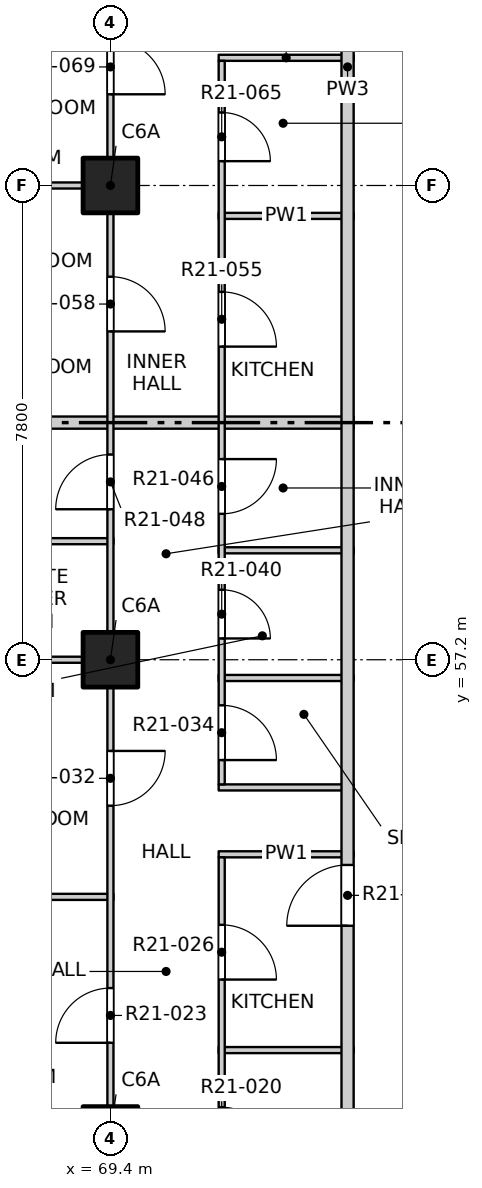
"""IFC4 building model, lengths in metres.
Left out: names, types, materials, properties, quantities, classifications, styles, units other than length and angle.
Written with IfcOpenShell. Run it as: python <this file> out.ifc"""

import sys

from ifc_helpers import new_model, si_unit, direction, frame, frame_2d, origin, origin_2d, place, context, subcontext, project, spatial, rectangle, extrude, element, fill, save


model = new_model("IFC4")
c1 = context("Model", 3, precision=1e-05, world=origin(), true_north=direction((0.0, 1.0)))
c2 = subcontext(c1, "Body", "Model", "MODEL_VIEW")
j1 = project(units=[si_unit("LENGTHUNIT", "METRE"), si_unit("PLANEANGLEUNIT", "RADIAN")], contexts=[c1])
p1 = place(None, origin())
s1 = spatial("IfcSite", under=j1, at=p1, CompositionType="ELEMENT")
p2 = place(p1, origin())
s2 = spatial("IfcBuilding", under=s1, at=p2, CompositionType="ELEMENT")
p3 = place(p2, frame((0.0, 0.0, 214.3)))
s3 = spatial("IfcBuildingStorey", under=s2, at=p3, CompositionType="ELEMENT", Elevation=214.3)
for number, where, z_axis, x_axis in (
    (1, (69.4, 49.4, -0.25), (0.0, 0.0, 1.0), (1.0, 0.0, 0.0)),
    (2, (69.4, 57.2, -0.25), (0.0, 0.0, 1.0), (1.0, 0.0, 0.0)),
    (3, (69.4, 65.0, -0.25), (0.0, 0.0, 1.0), (1.0, 0.0, 0.0)),
):
    element("IfcColumn", number, at=place(p3, frame(where, z_axis=z_axis, x_axis=x_axis)), inside=s3, PredefinedType="COLUMN", context=c2, shape_type="SweptSolid", body=[
        extrude(rectangle(XDim=0.9, YDim=0.9, at=origin_2d()), origin(), (0.0, 0.0, 1.0), 3.4),
    ])
p4 = place(p3, frame((71.18, 50.78, 0.0), z_axis=(0.0, 0.0, 1.0), x_axis=(1.0, 0.0, 0.0)))
e4 = element("IfcWall", 4, at=p4, inside=s3, PredefinedType="PARTITIONING", context=c2, shape_type="SweptSolid", body=[
    extrude(rectangle(XDim=2.22, YDim=0.1, at=frame_2d((1.11, 0.0))), origin(), (0.0, 0.0, 1.0), 3.15),
])
p5 = place(p3, frame((61.9, 53.3, 0.0), z_axis=(0.0, 0.0, 1.0), x_axis=(1.0, 0.0, 0.0)))
e5 = element("IfcWall", 5, at=p5, inside=s3, PredefinedType="PARTITIONING", context=c2, shape_type="SweptSolid", body=[
    extrude(rectangle(XDim=7.55, YDim=0.1, at=frame_2d((3.775, 0.0))), origin(), (0.0, 0.0, 1.0), 3.15),
])
for number, where, z_axis, x_axis in (
    (6, (71.18, 54.0, 0.0), (0.0, 0.0, 1.0), (1.0, 0.0, 0.0)),
    (7, (71.18, 55.1, 0.0), (0.0, 0.0, 1.0), (1.0, 0.0, 0.0)),
    (8, (71.18, 56.9, 0.0), (0.0, 0.0, 1.0), (1.0, 0.0, 0.0)),
):
    element("IfcWall", number, at=place(p3, frame(where, z_axis=z_axis, x_axis=x_axis)), inside=s3, PredefinedType="PARTITIONING", context=c2, shape_type="SweptSolid", body=[
        extrude(rectangle(XDim=2.22, YDim=0.1, at=frame_2d((1.11, 0.0))), origin(), (0.0, 0.0, 1.0), 3.15),
    ])
p6 = place(p3, frame((61.9, 57.2, 0.0), z_axis=(0.0, 0.0, 1.0), x_axis=(1.0, 0.0, 0.0)))
e9 = element("IfcWall", 9, at=p6, inside=s3, PredefinedType="PARTITIONING", context=c2, shape_type="SweptSolid", body=[
    extrude(rectangle(XDim=7.55, YDim=0.1, at=frame_2d((3.775, 0.0))), origin(), (0.0, 0.0, 1.0), 3.15),
])
p7 = place(p3, frame((71.18, 59.0, 0.0), z_axis=(0.0, 0.0, 1.0), x_axis=(1.0, 0.0, 0.0)))
e10 = element("IfcWall", 10, at=p7, inside=s3, PredefinedType="PARTITIONING", context=c2, shape_type="SweptSolid", body=[
    extrude(rectangle(XDim=2.22, YDim=0.1, at=frame_2d((1.11, 0.0))), origin(), (0.0, 0.0, 1.0), 3.15),
])
p8 = place(p3, frame((65.9, 59.15, 0.0), z_axis=(0.0, 0.0, 1.0), x_axis=(1.0, 0.0, 0.0)))
e11 = element("IfcWall", 11, at=p8, inside=s3, PredefinedType="PARTITIONING", context=c2, shape_type="SweptSolid", body=[
    extrude(rectangle(XDim=3.55, YDim=0.1, at=frame_2d((1.775, 0.0))), origin(), (0.0, 0.0, 1.0), 3.15),
])
p9 = place(p3, frame((61.9, 61.1, 0.0), z_axis=(0.0, 0.0, 1.0), x_axis=(1.0, 0.0, 0.0)))
e12 = element("IfcWall", 12, at=p9, inside=s3, PredefinedType="PARTITIONING", context=c2, shape_type="SweptSolid", body=[
    extrude(rectangle(XDim=11.5, YDim=0.2, at=frame_2d((5.75, 0.0))), origin(), (0.0, 0.0, 1.0), 2.55),
])
p10 = place(p3, frame((71.18, 64.5, 0.0), z_axis=(0.0, 0.0, 1.0), x_axis=(1.0, 0.0, 0.0)))
e13 = element("IfcWall", 13, at=p10, inside=s3, PredefinedType="PARTITIONING", context=c2, shape_type="SweptSolid", body=[
    extrude(rectangle(XDim=2.22, YDim=0.1, at=frame_2d((1.11, 0.0))), origin(), (0.0, 0.0, 1.0), 3.15),
])
p11 = place(p3, frame((61.9, 65.0, 0.0), z_axis=(0.0, 0.0, 1.0), x_axis=(1.0, 0.0, 0.0)))
e14 = element("IfcWall", 14, at=p11, inside=s3, PredefinedType="PARTITIONING", context=c2, shape_type="SweptSolid", body=[
    extrude(rectangle(XDim=7.55, YDim=0.1, at=frame_2d((3.775, 0.0))), origin(), (0.0, 0.0, 1.0), 3.15),
])
p12 = place(p3, frame((71.18, 67.1, 0.0), z_axis=(0.0, 0.0, 1.0), x_axis=(1.0, 0.0, 0.0)))
e15 = element("IfcWall", 15, at=p12, inside=s3, PredefinedType="PARTITIONING", context=c2, shape_type="SweptSolid", body=[
    extrude(rectangle(XDim=2.22, YDim=0.1, at=frame_2d((1.11, 0.0))), origin(), (0.0, 0.0, 1.0), 3.15),
])
p13 = place(p3, frame((69.4, 41.9, 0.0), z_axis=(0.0, 0.0, 1.0), x_axis=(0.0, 1.0, 0.0)))
e16 = element("IfcWall", 16, at=p13, inside=s3, PredefinedType="PARTITIONING", context=c2, shape_type="SweptSolid", body=[
    extrude(rectangle(XDim=46.2, YDim=0.1, at=frame_2d((23.1, 0.0))), origin(), (0.0, 0.0, 1.0), 3.15),
])
p14 = place(p13, frame((1.2, 0.0, 0.0)))
e17 = element("IfcOpeningElement", 17, at=p14, cuts=e16, PredefinedType="OPENING", context=c2, shape_type="SweptSolid", body=[
    extrude(rectangle(XDim=0.9, YDim=2.1, at=frame_2d((0.45, 1.05))), frame((0.0, 0.06, 0.0), z_axis=(0.0, -1.0, 0.0), x_axis=(1.0, 0.0, 0.0)), (0.0, 0.0, 1.0), 0.12),
])
p15 = place(p13, frame((6.025, 0.0, 0.0)))
e18 = element("IfcOpeningElement", 18, at=p15, cuts=e16, PredefinedType="OPENING", context=c2, shape_type="SweptSolid", body=[
    extrude(rectangle(XDim=0.9, YDim=2.1, at=frame_2d((0.45, 1.05))), frame((0.0, 0.06, 0.0), z_axis=(0.0, -1.0, 0.0), x_axis=(1.0, 0.0, 0.0)), (0.0, 0.0, 1.0), 0.12),
])
p16 = place(p13, frame((9.0, 0.0, 0.0)))
e19 = element("IfcOpeningElement", 19, at=p16, cuts=e16, PredefinedType="OPENING", context=c2, shape_type="SweptSolid", body=[
    extrude(rectangle(XDim=0.9, YDim=2.1, at=frame_2d((0.45, 1.05))), frame((0.0, 0.06, 0.0), z_axis=(0.0, -1.0, 0.0), x_axis=(1.0, 0.0, 0.0)), (0.0, 0.0, 1.0), 0.12),
])
p17 = place(p13, frame((12.9, 0.0, 0.0)))
e20 = element("IfcOpeningElement", 20, at=p17, cuts=e16, PredefinedType="OPENING", context=c2, shape_type="SweptSolid", body=[
    extrude(rectangle(XDim=0.9, YDim=2.1, at=frame_2d((0.45, 1.05))), frame((0.0, 0.06, 0.0), z_axis=(0.0, -1.0, 0.0), x_axis=(1.0, 0.0, 0.0)), (0.0, 0.0, 1.0), 0.12),
])
p18 = place(p13, frame((17.775, 0.0, 0.0)))
e21 = element("IfcOpeningElement", 21, at=p18, cuts=e16, PredefinedType="OPENING", context=c2, shape_type="SweptSolid", body=[
    extrude(rectangle(XDim=0.9, YDim=2.1, at=frame_2d((0.45, 1.05))), frame((0.0, 0.06, 0.0), z_axis=(0.0, -1.0, 0.0), x_axis=(1.0, 0.0, 0.0)), (0.0, 0.0, 1.0), 0.12),
])
p19 = place(p13, frame((20.7, 0.0, 0.0)))
e22 = element("IfcOpeningElement", 22, at=p19, cuts=e16, PredefinedType="OPENING", context=c2, shape_type="SweptSolid", body=[
    extrude(rectangle(XDim=0.9, YDim=2.1, at=frame_2d((0.45, 1.05))), frame((0.0, 0.06, 0.0), z_axis=(0.0, -1.0, 0.0), x_axis=(1.0, 0.0, 0.0)), (0.0, 0.0, 1.0), 0.12),
])
p20 = place(p13, frame((24.6, 0.0, 0.0)))
e23 = element("IfcOpeningElement", 23, at=p20, cuts=e16, PredefinedType="OPENING", context=c2, shape_type="SweptSolid", body=[
    extrude(rectangle(XDim=0.9, YDim=2.1, at=frame_2d((0.45, 1.05))), frame((0.0, 0.06, 0.0), z_axis=(0.0, -1.0, 0.0), x_axis=(1.0, 0.0, 0.0)), (0.0, 0.0, 1.0), 0.12),
])
p21 = place(p13, frame((29.425, 0.0, 0.0)))
e24 = element("IfcOpeningElement", 24, at=p21, cuts=e16, PredefinedType="OPENING", context=c2, shape_type="SweptSolid", body=[
    extrude(rectangle(XDim=0.9, YDim=2.1, at=frame_2d((0.45, 1.05))), frame((0.0, 0.06, 0.0), z_axis=(0.0, -1.0, 0.0), x_axis=(1.0, 0.0, 0.0)), (0.0, 0.0, 1.0), 0.12),
])
p22 = place(p13, frame((33.375, 0.0, 0.0)))
e25 = element("IfcOpeningElement", 25, at=p22, cuts=e16, PredefinedType="OPENING", context=c2, shape_type="SweptSolid", body=[
    extrude(rectangle(XDim=0.9, YDim=2.1, at=frame_2d((0.45, 1.05))), frame((0.0, 0.06, 0.0), z_axis=(0.0, -1.0, 0.0), x_axis=(1.0, 0.0, 0.0)), (0.0, 0.0, 1.0), 0.12),
])
p23 = place(p13, frame((36.3, 0.0, 0.0)))
e26 = element("IfcOpeningElement", 26, at=p23, cuts=e16, PredefinedType="OPENING", context=c2, shape_type="SweptSolid", body=[
    extrude(rectangle(XDim=0.9, YDim=2.1, at=frame_2d((0.45, 1.05))), frame((0.0, 0.06, 0.0), z_axis=(0.0, -1.0, 0.0), x_axis=(1.0, 0.0, 0.0)), (0.0, 0.0, 1.0), 0.12),
])
p24 = place(p13, frame((41.175, 0.0, 0.0)))
e27 = element("IfcOpeningElement", 27, at=p24, cuts=e16, PredefinedType="OPENING", context=c2, shape_type="SweptSolid", body=[
    extrude(rectangle(XDim=0.9, YDim=2.1, at=frame_2d((0.45, 1.05))), frame((0.0, 0.06, 0.0), z_axis=(0.0, -1.0, 0.0), x_axis=(1.0, 0.0, 0.0)), (0.0, 0.0, 1.0), 0.12),
])
p25 = place(p13, frame((44.1, 0.0, 0.0)))
e28 = element("IfcOpeningElement", 28, at=p25, cuts=e16, PredefinedType="OPENING", context=c2, shape_type="SweptSolid", body=[
    extrude(rectangle(XDim=0.9, YDim=2.1, at=frame_2d((0.45, 1.05))), frame((0.0, 0.06, 0.0), z_axis=(0.0, -1.0, 0.0), x_axis=(1.0, 0.0, 0.0)), (0.0, 0.0, 1.0), 0.12),
])
p26 = place(p3, frame((71.23, 45.55, 0.0), z_axis=(0.0, 0.0, 1.0), x_axis=(0.0, 1.0, 0.0)))
e29 = element("IfcWall", 29, at=p26, inside=s3, PredefinedType="PARTITIONING", context=c2, shape_type="SweptSolid", body=[
    extrude(rectangle(XDim=8.4, YDim=0.1, at=frame_2d((4.2, 0.0))), origin(), (0.0, 0.0, 1.0), 3.15),
])
p27 = place(p26, frame((0.85, 0.0, 0.0)))
e30 = element("IfcOpeningElement", 30, at=p27, cuts=e29, PredefinedType="OPENING", context=c2, shape_type="SweptSolid", body=[
    extrude(rectangle(XDim=0.8, YDim=2.1, at=frame_2d((0.4, 1.05))), frame((0.0, 0.06, 0.0), z_axis=(0.0, -1.0, 0.0), x_axis=(1.0, 0.0, 0.0)), (0.0, 0.0, 1.0), 0.12),
])
p28 = place(p26, frame((3.49, 0.0, 0.0)))
e31 = element("IfcOpeningElement", 31, at=p28, cuts=e29, PredefinedType="OPENING", context=c2, shape_type="SweptSolid", body=[
    extrude(rectangle(XDim=0.8, YDim=2.1, at=frame_2d((0.4, 1.05))), frame((0.0, 0.06, 0.0), z_axis=(0.0, -1.0, 0.0), x_axis=(1.0, 0.0, 0.0)), (0.0, 0.0, 1.0), 0.12),
])
p29 = place(p26, frame((6.39, 0.0, 0.0)))
e32 = element("IfcOpeningElement", 32, at=p29, cuts=e29, PredefinedType="OPENING", context=c2, shape_type="SweptSolid", body=[
    extrude(rectangle(XDim=0.9, YDim=2.1, at=frame_2d((0.45, 1.05))), frame((0.0, 0.06, 0.0), z_axis=(0.0, -1.0, 0.0), x_axis=(1.0, 0.0, 0.0)), (0.0, 0.0, 1.0), 0.12),
])
p30 = place(p3, frame((71.23, 55.15, 0.0), z_axis=(0.0, 0.0, 1.0), x_axis=(0.0, 1.0, 0.0)))
e33 = element("IfcWall", 33, at=p30, inside=s3, PredefinedType="PARTITIONING", context=c2, shape_type="SweptSolid", body=[
    extrude(rectangle(XDim=11.9, YDim=0.1, at=frame_2d((5.95, 0.0))), origin(), (0.0, 0.0, 1.0), 3.15),
])
p31 = place(p30, frame((0.4, 0.0, 0.0)))
e34 = element("IfcOpeningElement", 34, at=p31, cuts=e33, PredefinedType="OPENING", context=c2, shape_type="SweptSolid", body=[
    extrude(rectangle(XDim=0.9, YDim=2.1, at=frame_2d((0.45, 1.05))), frame((0.0, 0.06, 0.0), z_axis=(0.0, -1.0, 0.0), x_axis=(1.0, 0.0, 0.0)), (0.0, 0.0, 1.0), 0.12),
])
p32 = place(p30, frame((2.4, 0.0, 0.0)))
e35 = element("IfcOpeningElement", 35, at=p32, cuts=e33, PredefinedType="OPENING", context=c2, shape_type="SweptSolid", body=[
    extrude(rectangle(XDim=0.8, YDim=2.1, at=frame_2d((0.4, 1.05))), frame((0.0, 0.06, 0.0), z_axis=(0.0, -1.0, 0.0), x_axis=(1.0, 0.0, 0.0)), (0.0, 0.0, 1.0), 0.12),
])
p33 = place(p30, frame((4.45, 0.0, 0.0)))
e36 = element("IfcOpeningElement", 36, at=p33, cuts=e33, PredefinedType="OPENING", context=c2, shape_type="SweptSolid", body=[
    extrude(rectangle(XDim=0.9, YDim=2.1, at=frame_2d((0.45, 1.05))), frame((0.0, 0.06, 0.0), z_axis=(0.0, -1.0, 0.0), x_axis=(1.0, 0.0, 0.0)), (0.0, 0.0, 1.0), 0.12),
])
p34 = place(p30, frame((7.2, 0.0, 0.0)))
e37 = element("IfcOpeningElement", 37, at=p34, cuts=e33, PredefinedType="OPENING", context=c2, shape_type="SweptSolid", body=[
    extrude(rectangle(XDim=0.9, YDim=2.1, at=frame_2d((0.45, 1.05))), frame((0.0, 0.06, 0.0), z_axis=(0.0, -1.0, 0.0), x_axis=(1.0, 0.0, 0.0)), (0.0, 0.0, 1.0), 0.12),
])
p35 = place(p30, frame((10.25, 0.0, 0.0)))
e38 = element("IfcOpeningElement", 38, at=p35, cuts=e33, PredefinedType="OPENING", context=c2, shape_type="SweptSolid", body=[
    extrude(rectangle(XDim=0.8, YDim=2.1, at=frame_2d((0.4, 1.05))), frame((0.0, 0.06, 0.0), z_axis=(0.0, -1.0, 0.0), x_axis=(1.0, 0.0, 0.0)), (0.0, 0.0, 1.0), 0.12),
])
p36 = place(p3, frame((73.3, 49.5, 0.0), z_axis=(0.0, 0.0, 1.0), x_axis=(0.0, 1.0, 0.0)))
e39 = element("IfcWall", 39, at=p36, inside=s3, PredefinedType="PARTITIONING", context=c2, shape_type="SweptSolid", body=[
    extrude(rectangle(XDim=34.9, YDim=0.2, at=frame_2d((17.45, 0.0))), origin(), (0.0, 0.0, 1.0), 3.15),
])
p37 = place(p36, frame((3.325, 0.0, 0.0)))
e40 = element("IfcOpeningElement", 40, at=p37, cuts=e39, PredefinedType="OPENING", context=c2, shape_type="SweptSolid", body=[
    extrude(rectangle(XDim=1.0, YDim=2.1, at=frame_2d((0.5, 1.05))), frame((0.0, 0.11, 0.0), z_axis=(0.0, -1.0, 0.0), x_axis=(1.0, 0.0, 0.0)), (0.0, 0.0, 1.0), 0.22),
])
p38 = place(p36, frame((18.875, 0.0, 0.0)))
e41 = element("IfcOpeningElement", 41, at=p38, cuts=e39, PredefinedType="OPENING", context=c2, shape_type="SweptSolid", body=[
    extrude(rectangle(XDim=1.0, YDim=2.1, at=frame_2d((0.5, 1.05))), frame((0.0, 0.11, 0.0), z_axis=(0.0, -1.0, 0.0), x_axis=(1.0, 0.0, 0.0)), (0.0, 0.0, 1.0), 0.22),
])
p39 = place(p36, frame((29.325, 0.0, 0.0)))
e42 = element("IfcOpeningElement", 42, at=p39, cuts=e39, PredefinedType="OPENING", context=c2, shape_type="SweptSolid", body=[
    extrude(rectangle(XDim=1.0, YDim=2.1, at=frame_2d((0.5, 1.05))), frame((0.0, 0.11, 0.0), z_axis=(0.0, -1.0, 0.0), x_axis=(1.0, 0.0, 0.0)), (0.0, 0.0, 1.0), 0.22),
])
p40 = place(p28, origin())
e43 = element("IfcDoor", 43, at=p40, inside=s3, OperationType="SINGLE_SWING_RIGHT", PredefinedType="DOOR", context=c2, shape_type="SweptSolid", body=[
    extrude(rectangle(XDim=0.8, YDim=2.1, at=frame_2d((0.4, 1.05))), frame((0.0, 0.025, 0.0), z_axis=(0.0, -1.0, 0.0), x_axis=(1.0, 0.0, 0.0)), (0.0, 0.0, 1.0), 0.05),
])
fill(e31, e43)
p41 = place(p16, origin())
e44 = element("IfcDoor", 44, at=p41, inside=s3, OperationType="SINGLE_SWING_LEFT", PredefinedType="DOOR", context=c2, shape_type="SweptSolid", body=[
    extrude(rectangle(XDim=0.9, YDim=2.1, at=frame_2d((0.45, 1.05))), frame((0.0, 0.025, 0.0), z_axis=(0.0, -1.0, 0.0), x_axis=(1.0, 0.0, 0.0)), (0.0, 0.0, 1.0), 0.05),
])
fill(e19, e44)
p42 = place(p29, origin())
e45 = element("IfcDoor", 45, at=p42, inside=s3, OperationType="SINGLE_SWING_RIGHT", PredefinedType="DOOR", context=c2, shape_type="SweptSolid", body=[
    extrude(rectangle(XDim=0.9, YDim=2.1, at=frame_2d((0.45, 1.05))), frame((0.0, 0.025, 0.0), z_axis=(0.0, -1.0, 0.0), x_axis=(1.0, 0.0, 0.0)), (0.0, 0.0, 1.0), 0.05),
])
fill(e32, e45)
p43 = place(p37, origin())
e46 = element("IfcDoor", 46, at=p43, inside=s3, OperationType="SINGLE_SWING_LEFT", PredefinedType="DOOR", context=c2, shape_type="SweptSolid", body=[
    extrude(rectangle(XDim=1.0, YDim=2.1, at=frame_2d((0.5, 1.05))), frame((0.0, 0.025, 0.0), z_axis=(0.0, -1.0, 0.0), x_axis=(1.0, 0.0, 0.0)), (0.0, 0.0, 1.0), 0.05),
])
fill(e40, e46)
p44 = place(p17, origin())
e47 = element("IfcDoor", 47, at=p44, inside=s3, OperationType="SINGLE_SWING_LEFT", PredefinedType="DOOR", context=c2, shape_type="SweptSolid", body=[
    extrude(rectangle(XDim=0.9, YDim=2.1, at=frame_2d((0.45, 1.05))), frame((0.0, 0.025, 0.0), z_axis=(0.0, -1.0, 0.0), x_axis=(1.0, 0.0, 0.0)), (0.0, 0.0, 1.0), 0.05),
])
fill(e20, e47)
p45 = place(p31, origin())
e48 = element("IfcDoor", 48, at=p45, inside=s3, OperationType="SINGLE_SWING_RIGHT", PredefinedType="DOOR", context=c2, shape_type="SweptSolid", body=[
    extrude(rectangle(XDim=0.9, YDim=2.1, at=frame_2d((0.45, 1.05))), frame((0.0, 0.025, 0.0), z_axis=(0.0, -1.0, 0.0), x_axis=(1.0, 0.0, 0.0)), (0.0, 0.0, 1.0), 0.05),
])
fill(e34, e48)
p46 = place(p32, origin())
e49 = element("IfcDoor", 49, at=p46, inside=s3, OperationType="SINGLE_SWING_RIGHT", PredefinedType="DOOR", context=c2, shape_type="SweptSolid", body=[
    extrude(rectangle(XDim=0.8, YDim=2.1, at=frame_2d((0.4, 1.05))), frame((0.0, 0.025, 0.0), z_axis=(0.0, -1.0, 0.0), x_axis=(1.0, 0.0, 0.0)), (0.0, 0.0, 1.0), 0.05),
])
fill(e35, e49)
p47 = place(p33, origin())
e50 = element("IfcDoor", 50, at=p47, inside=s3, OperationType="SINGLE_SWING_LEFT", PredefinedType="DOOR", context=c2, shape_type="SweptSolid", body=[
    extrude(rectangle(XDim=0.9, YDim=2.1, at=frame_2d((0.45, 1.05))), frame((0.0, 0.025, 0.0), z_axis=(0.0, -1.0, 0.0), x_axis=(1.0, 0.0, 0.0)), (0.0, 0.0, 1.0), 0.05),
])
fill(e36, e50)
p48 = place(p18, origin())
e51 = element("IfcDoor", 51, at=p48, inside=s3, OperationType="SINGLE_SWING_LEFT", PredefinedType="DOOR", context=c2, shape_type="SweptSolid", body=[
    extrude(rectangle(XDim=0.9, YDim=2.1, at=frame_2d((0.45, 1.05))), frame((0.0, 0.025, 0.0), z_axis=(0.0, -1.0, 0.0), x_axis=(1.0, 0.0, 0.0)), (0.0, 0.0, 1.0), 0.05),
])
fill(e21, e51)
p49 = place(p34, origin())
e52 = element("IfcDoor", 52, at=p49, inside=s3, OperationType="SINGLE_SWING_RIGHT", PredefinedType="DOOR", context=c2, shape_type="SweptSolid", body=[
    extrude(rectangle(XDim=0.9, YDim=2.1, at=frame_2d((0.45, 1.05))), frame((0.0, 0.025, 0.0), z_axis=(0.0, -1.0, 0.0), x_axis=(1.0, 0.0, 0.0)), (0.0, 0.0, 1.0), 0.05),
])
fill(e37, e52)
p50 = place(p19, origin())
e53 = element("IfcDoor", 53, at=p50, inside=s3, OperationType="SINGLE_SWING_RIGHT", PredefinedType="DOOR", context=c2, shape_type="SweptSolid", body=[
    extrude(rectangle(XDim=0.9, YDim=2.1, at=frame_2d((0.45, 1.05))), frame((0.0, 0.025, 0.0), z_axis=(0.0, -1.0, 0.0), x_axis=(1.0, 0.0, 0.0)), (0.0, 0.0, 1.0), 0.05),
])
fill(e22, e53)
p51 = place(p35, origin())
e54 = element("IfcDoor", 54, at=p51, inside=s3, OperationType="SINGLE_SWING_RIGHT", PredefinedType="DOOR", context=c2, shape_type="SweptSolid", body=[
    extrude(rectangle(XDim=0.8, YDim=2.1, at=frame_2d((0.4, 1.05))), frame((0.0, 0.025, 0.0), z_axis=(0.0, -1.0, 0.0), x_axis=(1.0, 0.0, 0.0)), (0.0, 0.0, 1.0), 0.05),
])
fill(e38, e54)
p52 = place(p20, origin())
e55 = element("IfcDoor", 55, at=p52, inside=s3, OperationType="SINGLE_SWING_RIGHT", PredefinedType="DOOR", context=c2, shape_type="SweptSolid", body=[
    extrude(rectangle(XDim=0.9, YDim=2.1, at=frame_2d((0.45, 1.05))), frame((0.0, 0.025, 0.0), z_axis=(0.0, -1.0, 0.0), x_axis=(1.0, 0.0, 0.0)), (0.0, 0.0, 1.0), 0.05),
])
fill(e23, e55)
save(model, sys.argv[1])
